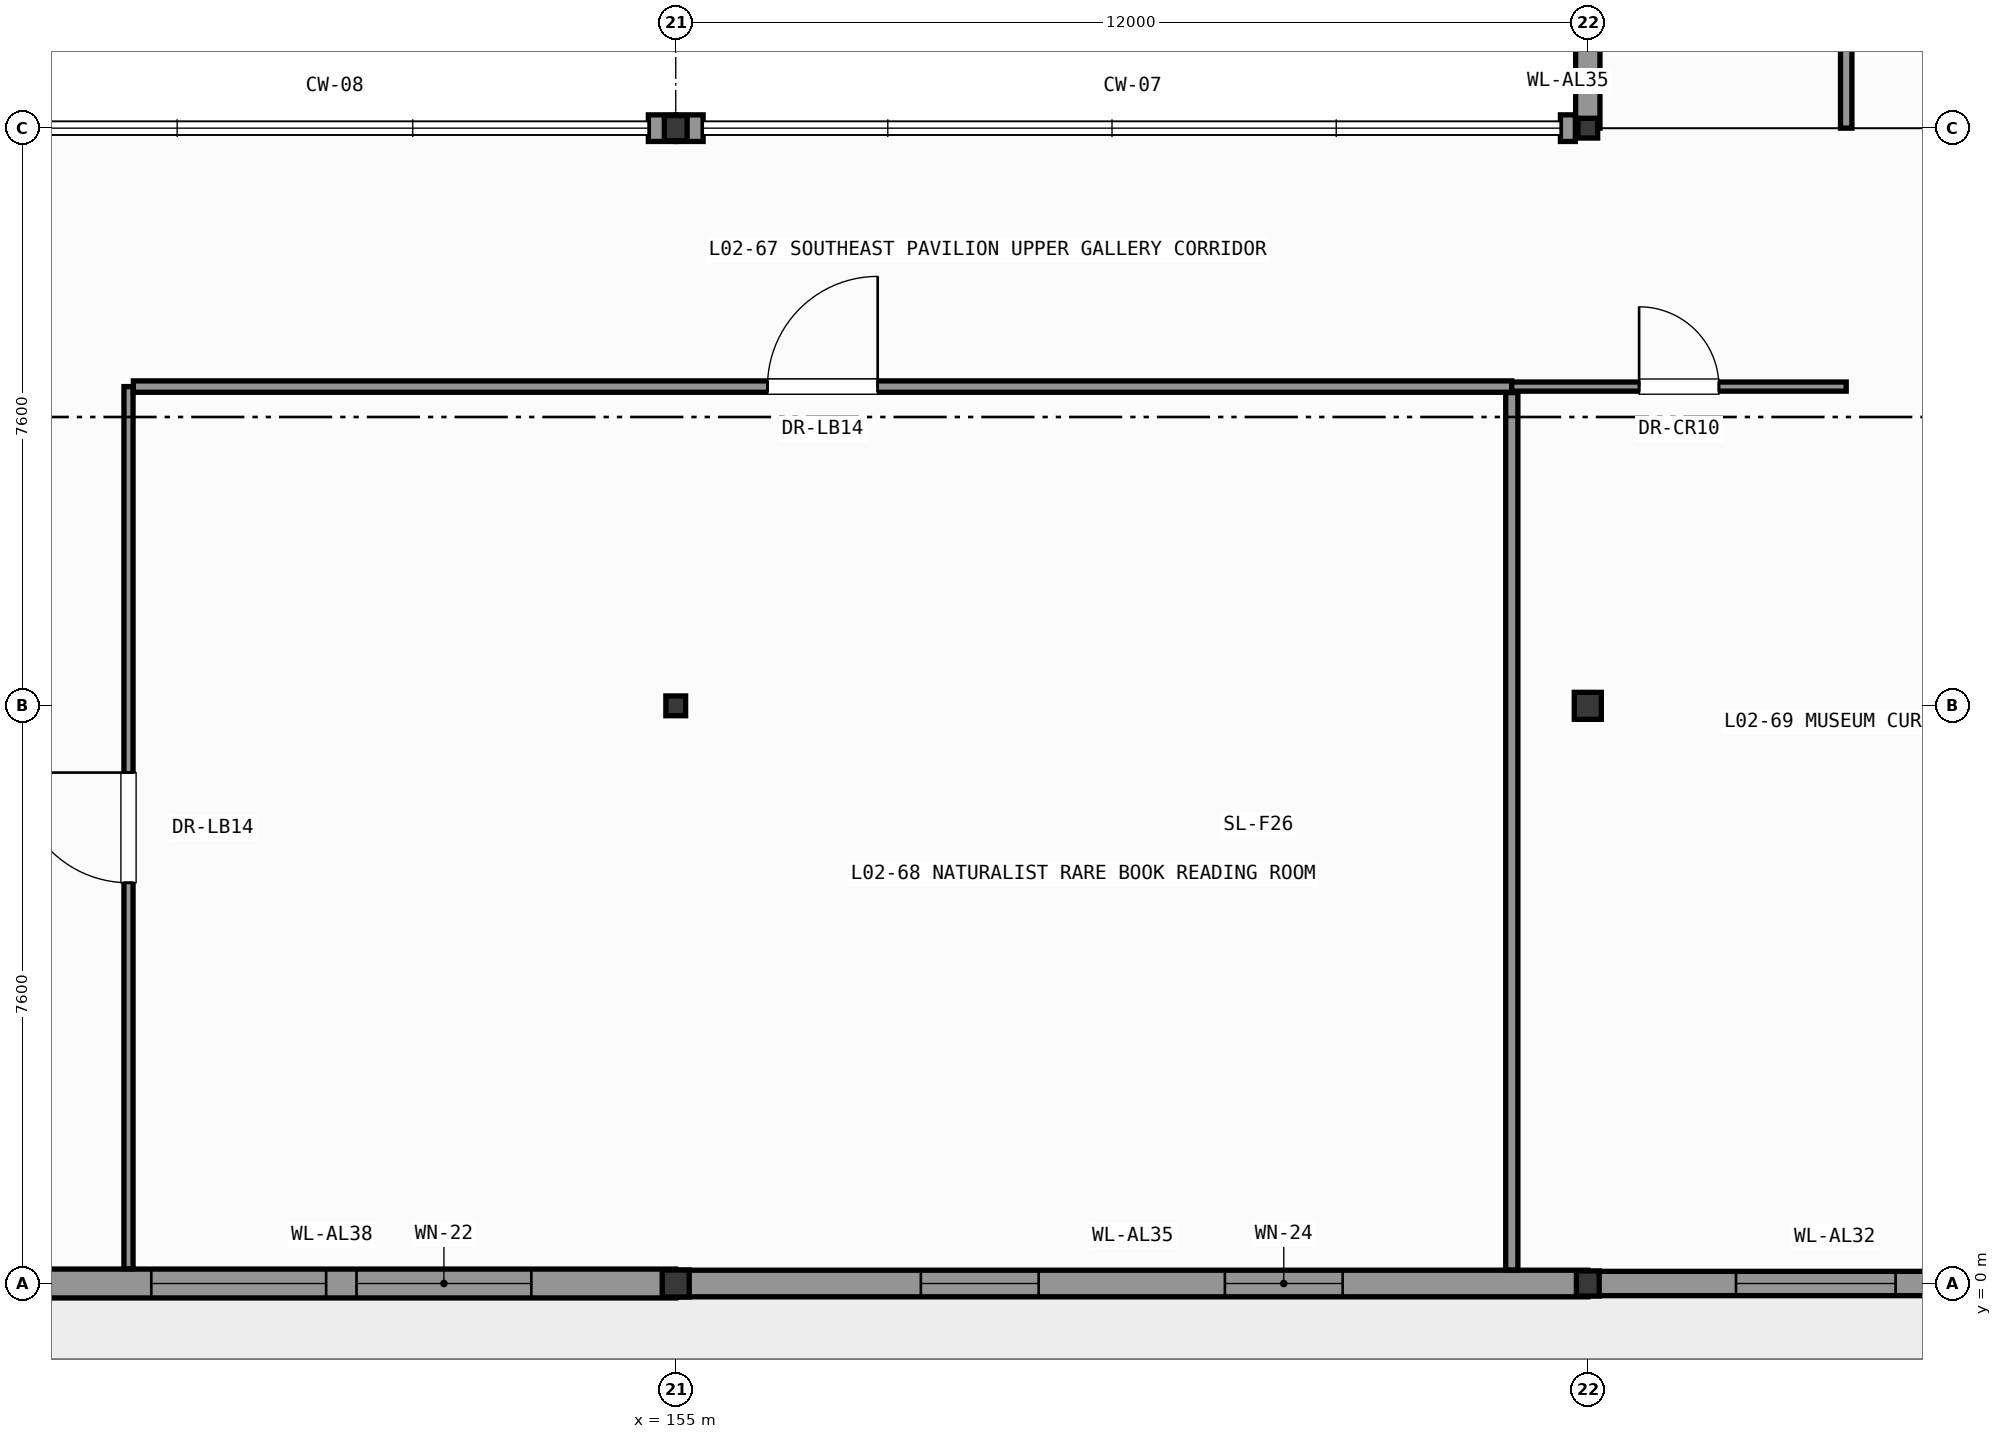
"""IFC4 building model, lengths in metres.
Left out: names, types, materials, properties, quantities, classifications, styles, units other than length and angle.
Written with IfcOpenShell. Run it as: python <this file> out.ifc"""

import sys

from ifc_helpers import new_model, si_unit, direction, frame, frame_2d, origin, origin_2d, place, context, subcontext, project, spatial, rectangle, hollow_rectangle, hollow_circle, i_section, extrude, element, fill, save


model = new_model("IFC4")
c1 = context("Model", 3, precision=1e-05, world=origin(), true_north=direction((0.0, 1.0)))
c2 = subcontext(c1, "Body", "Model", "MODEL_VIEW")
j1 = project(units=[si_unit("LENGTHUNIT", "METRE"), si_unit("PLANEANGLEUNIT", "RADIAN")], contexts=[c1])
p1 = place(None, origin())
s1 = spatial("IfcSite", under=j1, at=p1, CompositionType="ELEMENT")
p2 = place(p1, origin())
s2 = spatial("IfcBuilding", under=s1, at=p2, CompositionType="ELEMENT")
p3 = place(p2, frame((0.0, 0.0, 7.8)))
s3 = spatial("IfcBuildingStorey", under=s2, at=p3, CompositionType="ELEMENT", Elevation=7.8)
p4 = place(p3, frame((155.0, 0.0, 0.0), z_axis=(0.0, 0.0, 1.0), x_axis=(1.0, 0.0, 0.0)))
e1 = element("IfcColumn", 1, at=p4, inside=s3, PredefinedType="COLUMN", context=c2, shape_type="SweptSolid", body=[
    extrude(hollow_circle(Radius=0.178, WallThickness=0.016, at=origin_2d()), origin(), (0.0, 0.0, 1.0), 5.4),
])
p5 = place(p3, frame((155.0, 7.6, 0.0), z_axis=(0.0, 0.0, 1.0), x_axis=(1.0, 0.0, 0.0)))
e2 = element("IfcColumn", 2, at=p5, inside=s3, PredefinedType="COLUMN", context=c2, shape_type="SweptSolid", body=[
    extrude(hollow_rectangle(XDim=0.26, YDim=0.26, WallThickness=0.012, InnerFilletRadius=0.012, OuterFilletRadius=0.025, at=origin_2d()), origin(), (0.0, 0.0, 1.0), 5.4),
])
for number, where, z_axis, x_axis in (
    (3, (155.0, 15.2, 0.0), (0.0, 0.0, 1.0), (1.0, 0.0, 0.0)),
    (4, (167.0, 0.0, 0.0), (0.0, 0.0, 1.0), (1.0, 0.0, 0.0)),
):
    element("IfcColumn", number, at=place(p3, frame(where, z_axis=z_axis, x_axis=x_axis)), inside=s3, PredefinedType="COLUMN", context=c2, shape_type="SweptSolid", body=[
        extrude(i_section(OverallWidth=0.3, OverallDepth=0.33, WebThickness=0.01, FlangeThickness=0.017, FilletRadius=0.027, at=origin_2d()), origin(), (0.0, 0.0, 1.0), 5.4),
    ])
p6 = place(p3, frame((167.0, 7.6, 0.0), z_axis=(0.0, 0.0, 1.0), x_axis=(1.0, 0.0, 0.0)))
e5 = element("IfcColumn", 5, at=p6, inside=s3, PredefinedType="COLUMN", context=c2, shape_type="SweptSolid", body=[
    extrude(hollow_circle(Radius=0.178, WallThickness=0.016, at=origin_2d()), origin(), (0.0, 0.0, 1.0), 5.4),
])
p7 = place(p3, frame((167.0, 15.2, 0.0), z_axis=(0.0, 0.0, 1.0), x_axis=(1.0, 0.0, 0.0)))
e6 = element("IfcColumn", 6, at=p7, inside=s3, PredefinedType="COLUMN", context=c2, shape_type="SweptSolid", body=[
    extrude(hollow_rectangle(XDim=0.26, YDim=0.26, WallThickness=0.012, InnerFilletRadius=0.012, OuterFilletRadius=0.025, at=origin_2d()), origin(), (0.0, 0.0, 1.0), 5.4),
])
p8 = place(p3, frame((167.0, 15.2, 0.0), z_axis=(0.0, 0.0, 1.0), x_axis=(0.0, 1.0, 0.0)))
e7 = element("IfcWall", 7, at=p8, inside=s3, PredefinedType="SOLIDWALL", context=c2, shape_type="SweptSolid", body=[
    extrude(rectangle(XDim=7.6, YDim=0.32, at=frame_2d((3.8, 0.0))), origin(), (0.0, 0.0, 1.0), 5.15),
])
p9 = place(p8, frame((1.483, 0.0, 0.95)))
e8 = element("IfcOpeningElement", 8, at=p9, cuts=e7, PredefinedType="OPENING", context=c2, shape_type="SweptSolid", body=[
    extrude(rectangle(XDim=2.1, YDim=2.8, at=frame_2d((1.05, 1.4))), frame((0.0, 0.17, 0.0), z_axis=(0.0, -1.0, 0.0), x_axis=(1.0, 0.0, 0.0)), (0.0, 0.0, 1.0), 0.34),
])
p10 = place(p8, frame((4.017, 0.0, 0.95)))
e9 = element("IfcOpeningElement", 9, at=p10, cuts=e7, PredefinedType="OPENING", context=c2, shape_type="SweptSolid", body=[
    extrude(rectangle(XDim=2.1, YDim=2.8, at=frame_2d((1.05, 1.4))), frame((0.0, 0.17, 0.0), z_axis=(0.0, -1.0, 0.0), x_axis=(1.0, 0.0, 0.0)), (0.0, 0.0, 1.0), 0.34),
])
p11 = place(p3, frame((166.836, 15.2, 0.0), z_axis=(0.0, 0.0, 1.0), x_axis=(-1.0, 0.0, 0.0)))
e10 = element("IfcWall", 10, at=p11, inside=s3, PredefinedType="SOLIDWALL", context=c2, shape_type="SweptSolid", body=[
    extrude(rectangle(XDim=0.196, YDim=0.35, at=frame_2d((0.098, 0.0))), origin(), (0.0, 0.0, 1.0), 5.15),
])
p12 = place(p3, frame((155.36, 15.2, 0.0), z_axis=(0.0, 0.0, 1.0), x_axis=(-1.0, 0.0, 0.0)))
e11 = element("IfcWall", 11, at=p12, inside=s3, PredefinedType="SOLIDWALL", context=c2, shape_type="SweptSolid", body=[
    extrude(rectangle(XDim=0.36, YDim=0.35, at=frame_2d((0.18, 0.0))), origin(), (0.0, 0.0, 1.0), 4.535),
])
p13 = place(p3, frame((155.0, 15.2, 0.0), z_axis=(0.0, 0.0, 1.0), x_axis=(-1.0, 0.0, 0.0)))
e12 = element("IfcWall", 12, at=p13, inside=s3, PredefinedType="SOLIDWALL", context=c2, shape_type="SweptSolid", body=[
    extrude(rectangle(XDim=0.36, YDim=0.35, at=frame_2d((0.18, 0.0))), origin(), (0.0, 0.0, 1.0), 4.685),
])
p14 = place(p3, frame((155.0, 0.0, 0.0), z_axis=(0.0, 0.0, 1.0), x_axis=(-1.0, 0.0, 0.0)))
e13 = element("IfcWall", 13, at=p14, inside=s3, PredefinedType="SOLIDWALL", context=c2, shape_type="SweptSolid", body=[
    extrude(rectangle(XDim=9.0, YDim=0.38, at=frame_2d((4.5, 0.0))), origin(), (0.0, 0.0, 1.0), 4.745),
])
p15 = place(p14, frame((1.9, 0.0, 0.95)))
e14 = element("IfcOpeningElement", 14, at=p15, cuts=e13, PredefinedType="OPENING", context=c2, shape_type="SweptSolid", body=[
    extrude(rectangle(XDim=2.3, YDim=3.3, at=frame_2d((1.15, 1.65))), frame((0.0, 0.2, 0.0), z_axis=(0.0, -1.0, 0.0), x_axis=(1.0, 0.0, 0.0)), (0.0, 0.0, 1.0), 0.4),
])
p16 = place(p14, frame((4.6, 0.0, 0.95)))
e15 = element("IfcOpeningElement", 15, at=p16, cuts=e13, PredefinedType="OPENING", context=c2, shape_type="SweptSolid", body=[
    extrude(rectangle(XDim=2.3, YDim=3.3, at=frame_2d((1.15, 1.65))), frame((0.0, 0.2, 0.0), z_axis=(0.0, -1.0, 0.0), x_axis=(1.0, 0.0, 0.0)), (0.0, 0.0, 1.0), 0.4),
])
p17 = place(p3, frame((167.0, 0.0, 0.0), z_axis=(0.0, 0.0, 1.0), x_axis=(-1.0, 0.0, 0.0)))
e16 = element("IfcWall", 16, at=p17, inside=s3, PredefinedType="SOLIDWALL", context=c2, shape_type="SweptSolid", body=[
    extrude(rectangle(XDim=12.0, YDim=0.35, at=frame_2d((6.0, 0.0))), origin(), (0.0, 0.0, 1.0), 4.535),
])
p18 = place(p17, frame((3.225, 0.0, 0.95)))
e17 = element("IfcOpeningElement", 17, at=p18, cuts=e16, PredefinedType="OPENING", context=c2, shape_type="SweptSolid", body=[
    extrude(rectangle(XDim=1.55, YDim=2.1, at=frame_2d((0.775, 1.05))), frame((0.0, 0.185, 0.0), z_axis=(0.0, -1.0, 0.0), x_axis=(1.0, 0.0, 0.0)), (0.0, 0.0, 1.0), 0.37),
])
p19 = place(p17, frame((7.225, 0.0, 0.95)))
e18 = element("IfcOpeningElement", 18, at=p19, cuts=e16, PredefinedType="OPENING", context=c2, shape_type="SweptSolid", body=[
    extrude(rectangle(XDim=1.55, YDim=2.1, at=frame_2d((0.775, 1.05))), frame((0.0, 0.185, 0.0), z_axis=(0.0, -1.0, 0.0), x_axis=(1.0, 0.0, 0.0)), (0.0, 0.0, 1.0), 0.37),
])
p20 = place(p3, frame((173.0, 0.0, 0.0), z_axis=(0.0, 0.0, 1.0), x_axis=(-1.0, 0.0, 0.0)))
e19 = element("IfcWall", 19, at=p20, inside=s3, PredefinedType="SOLIDWALL", context=c2, shape_type="SweptSolid", body=[
    extrude(rectangle(XDim=6.0, YDim=0.32, at=frame_2d((3.0, 0.0))), origin(), (0.0, 0.0, 1.0), 5.15),
])
p21 = place(p20, frame((1.95, 0.0, 0.95)))
e20 = element("IfcOpeningElement", 20, at=p21, cuts=e19, PredefinedType="OPENING", context=c2, shape_type="SweptSolid", body=[
    extrude(rectangle(XDim=2.1, YDim=2.8, at=frame_2d((1.05, 1.4))), frame((0.0, 0.17, 0.0), z_axis=(0.0, -1.0, 0.0), x_axis=(1.0, 0.0, 0.0)), (0.0, 0.0, 1.0), 0.34),
])
p22 = place(p3, frame((147.8, 0.194, 0.0), z_axis=(0.0, 0.0, 1.0), x_axis=(0.0, 1.0, 0.0)))
e21 = element("IfcWall", 21, at=p22, inside=s3, PredefinedType="PARTITIONING", context=c2, shape_type="SweptSolid", body=[
    extrude(rectangle(XDim=11.606, YDim=0.12, at=frame_2d((5.803, 0.0))), origin(), (0.0, 0.0, 1.0), 5.15),
])
p23 = place(p22, frame((5.078, 0.0, 0.0)))
e22 = element("IfcOpeningElement", 22, at=p23, cuts=e21, PredefinedType="OPENING", context=c2, shape_type="SweptSolid", body=[
    extrude(rectangle(XDim=1.45, YDim=2.35, at=frame_2d((0.725, 1.175))), frame((0.0, 0.07, 0.0), z_axis=(0.0, -1.0, 0.0), x_axis=(1.0, 0.0, 0.0)), (0.0, 0.0, 1.0), 0.14),
])
p24 = place(p3, frame((147.864, 11.8, 0.0), z_axis=(0.0, 0.0, 1.0), x_axis=(1.0, 0.0, 0.0)))
e23 = element("IfcWall", 23, at=p24, inside=s3, PredefinedType="PARTITIONING", context=c2, shape_type="SweptSolid", body=[
    extrude(rectangle(XDim=18.136, YDim=0.15, at=frame_2d((9.068, 0.0))), origin(), (0.0, 0.0, 1.0), 5.15),
])
p25 = place(p24, frame((8.343, 0.0, 0.0)))
e24 = element("IfcOpeningElement", 24, at=p25, cuts=e23, PredefinedType="OPENING", context=c2, shape_type="SweptSolid", body=[
    extrude(rectangle(XDim=1.45, YDim=2.35, at=frame_2d((0.725, 1.175))), frame((0.0, 0.085, 0.0), z_axis=(0.0, -1.0, 0.0), x_axis=(1.0, 0.0, 0.0)), (0.0, 0.0, 1.0), 0.17),
])
p26 = place(p3, frame((166.0, 11.8, 0.0), z_axis=(0.0, 0.0, 1.0), x_axis=(1.0, 0.0, 0.0)))
e25 = element("IfcWall", 25, at=p26, inside=s3, PredefinedType="PARTITIONING", context=c2, shape_type="SweptSolid", body=[
    extrude(rectangle(XDim=4.4, YDim=0.12, at=frame_2d((2.2, 0.0))), origin(), (0.0, 0.0, 1.0), 5.15),
])
p27 = place(p26, frame((1.675, 0.0, 0.0)))
e26 = element("IfcOpeningElement", 26, at=p27, cuts=e25, PredefinedType="OPENING", context=c2, shape_type="SweptSolid", body=[
    extrude(rectangle(XDim=1.05, YDim=2.2, at=frame_2d((0.525, 1.1))), frame((0.0, 0.07, 0.0), z_axis=(0.0, -1.0, 0.0), x_axis=(1.0, 0.0, 0.0)), (0.0, 0.0, 1.0), 0.14),
])
p28 = place(p3, frame((166.0, 0.179, 0.0), z_axis=(0.0, 0.0, 1.0), x_axis=(0.0, 1.0, 0.0)))
e27 = element("IfcWall", 27, at=p28, inside=s3, PredefinedType="PARTITIONING", context=c2, shape_type="SweptSolid", body=[
    extrude(rectangle(XDim=11.542, YDim=0.16, at=frame_2d((5.771, 0.0))), origin(), (0.0, 0.0, 1.0), 5.15),
])
p29 = place(p3, frame((170.4, 15.2, 0.0), z_axis=(0.0, 0.0, 1.0), x_axis=(0.0, 1.0, 0.0)))
e28 = element("IfcWall", 28, at=p29, inside=s3, PredefinedType="PARTITIONING", context=c2, shape_type="SweptSolid", body=[
    extrude(rectangle(XDim=37.4, YDim=0.15, at=frame_2d((18.7, 0.0))), origin(), (0.0, 0.0, 1.0), 5.15),
])
p30 = place(p29, frame((17.6, 0.0, 0.0)))
e29 = element("IfcOpeningElement", 29, at=p30, cuts=e28, PredefinedType="OPENING", context=c2, shape_type="SweptSolid", body=[
    extrude(rectangle(XDim=2.2, YDim=2.6, at=frame_2d((1.1, 1.3))), frame((0.0, 0.085, 0.0), z_axis=(0.0, -1.0, 0.0), x_axis=(1.0, 0.0, 0.0)), (0.0, 0.0, 1.0), 0.17),
])
p31 = place(p15, origin())
e30 = element("IfcWindow", 30, at=p31, inside=s3, PartitioningType="SINGLE_PANEL", PredefinedType="WINDOW", context=c2, shape_type="SweptSolid", body=[
    extrude(rectangle(XDim=2.3, YDim=3.3, at=frame_2d((1.15, 1.65))), frame((0.0, 0.03, 0.0), z_axis=(0.0, -1.0, 0.0), x_axis=(1.0, 0.0, 0.0)), (0.0, 0.0, 1.0), 0.06),
])
fill(e14, e30)
p32 = place(p16, origin())
e31 = element("IfcWindow", 31, at=p32, inside=s3, PartitioningType="SINGLE_PANEL", PredefinedType="WINDOW", context=c2, shape_type="SweptSolid", body=[
    extrude(rectangle(XDim=2.3, YDim=3.3, at=frame_2d((1.15, 1.65))), frame((0.0, 0.03, 0.0), z_axis=(0.0, -1.0, 0.0), x_axis=(1.0, 0.0, 0.0)), (0.0, 0.0, 1.0), 0.06),
])
fill(e15, e31)
p33 = place(p18, origin())
e32 = element("IfcWindow", 32, at=p33, inside=s3, PartitioningType="SINGLE_PANEL", PredefinedType="WINDOW", context=c2, shape_type="SweptSolid", body=[
    extrude(rectangle(XDim=1.55, YDim=2.1, at=frame_2d((0.775, 1.05))), frame((0.0, 0.03, 0.0), z_axis=(0.0, -1.0, 0.0), x_axis=(1.0, 0.0, 0.0)), (0.0, 0.0, 1.0), 0.06),
])
fill(e17, e32)
p34 = place(p19, origin())
e33 = element("IfcWindow", 33, at=p34, inside=s3, PartitioningType="SINGLE_PANEL", PredefinedType="WINDOW", context=c2, shape_type="SweptSolid", body=[
    extrude(rectangle(XDim=1.55, YDim=2.1, at=frame_2d((0.775, 1.05))), frame((0.0, 0.03, 0.0), z_axis=(0.0, -1.0, 0.0), x_axis=(1.0, 0.0, 0.0)), (0.0, 0.0, 1.0), 0.06),
])
fill(e18, e33)
p35 = place(p21, origin())
e34 = element("IfcWindow", 34, at=p35, inside=s3, PartitioningType="SINGLE_PANEL", PredefinedType="WINDOW", context=c2, shape_type="SweptSolid", body=[
    extrude(rectangle(XDim=2.1, YDim=2.8, at=frame_2d((1.05, 1.4))), frame((0.0, 0.03, 0.0), z_axis=(0.0, -1.0, 0.0), x_axis=(1.0, 0.0, 0.0)), (0.0, 0.0, 1.0), 0.06),
])
fill(e20, e34)
p36 = place(p23, origin())
e35 = element("IfcDoor", 35, at=p36, inside=s3, OperationType="SINGLE_SWING_RIGHT", PredefinedType="DOOR", context=c2, shape_type="SweptSolid", body=[
    extrude(rectangle(XDim=1.45, YDim=2.35, at=frame_2d((0.725, 1.175))), frame((0.0, 0.025, 0.0), z_axis=(0.0, -1.0, 0.0), x_axis=(1.0, 0.0, 0.0)), (0.0, 0.0, 1.0), 0.05),
])
fill(e22, e35)
p37 = place(p25, origin())
e36 = element("IfcDoor", 36, at=p37, inside=s3, OperationType="SINGLE_SWING_RIGHT", PredefinedType="DOOR", context=c2, shape_type="SweptSolid", body=[
    extrude(rectangle(XDim=1.45, YDim=2.35, at=frame_2d((0.725, 1.175))), frame((0.0, 0.025, 0.0), z_axis=(0.0, -1.0, 0.0), x_axis=(1.0, 0.0, 0.0)), (0.0, 0.0, 1.0), 0.05),
])
fill(e24, e36)
p38 = place(p27, origin())
e37 = element("IfcDoor", 37, at=p38, inside=s3, OperationType="SINGLE_SWING_LEFT", PredefinedType="DOOR", context=c2, shape_type="SweptSolid", body=[
    extrude(rectangle(XDim=1.05, YDim=2.2, at=frame_2d((0.525, 1.1))), frame((0.0, 0.025, 0.0), z_axis=(0.0, -1.0, 0.0), x_axis=(1.0, 0.0, 0.0)), (0.0, 0.0, 1.0), 0.05),
])
fill(e26, e37)
save(model, sys.argv[1])
